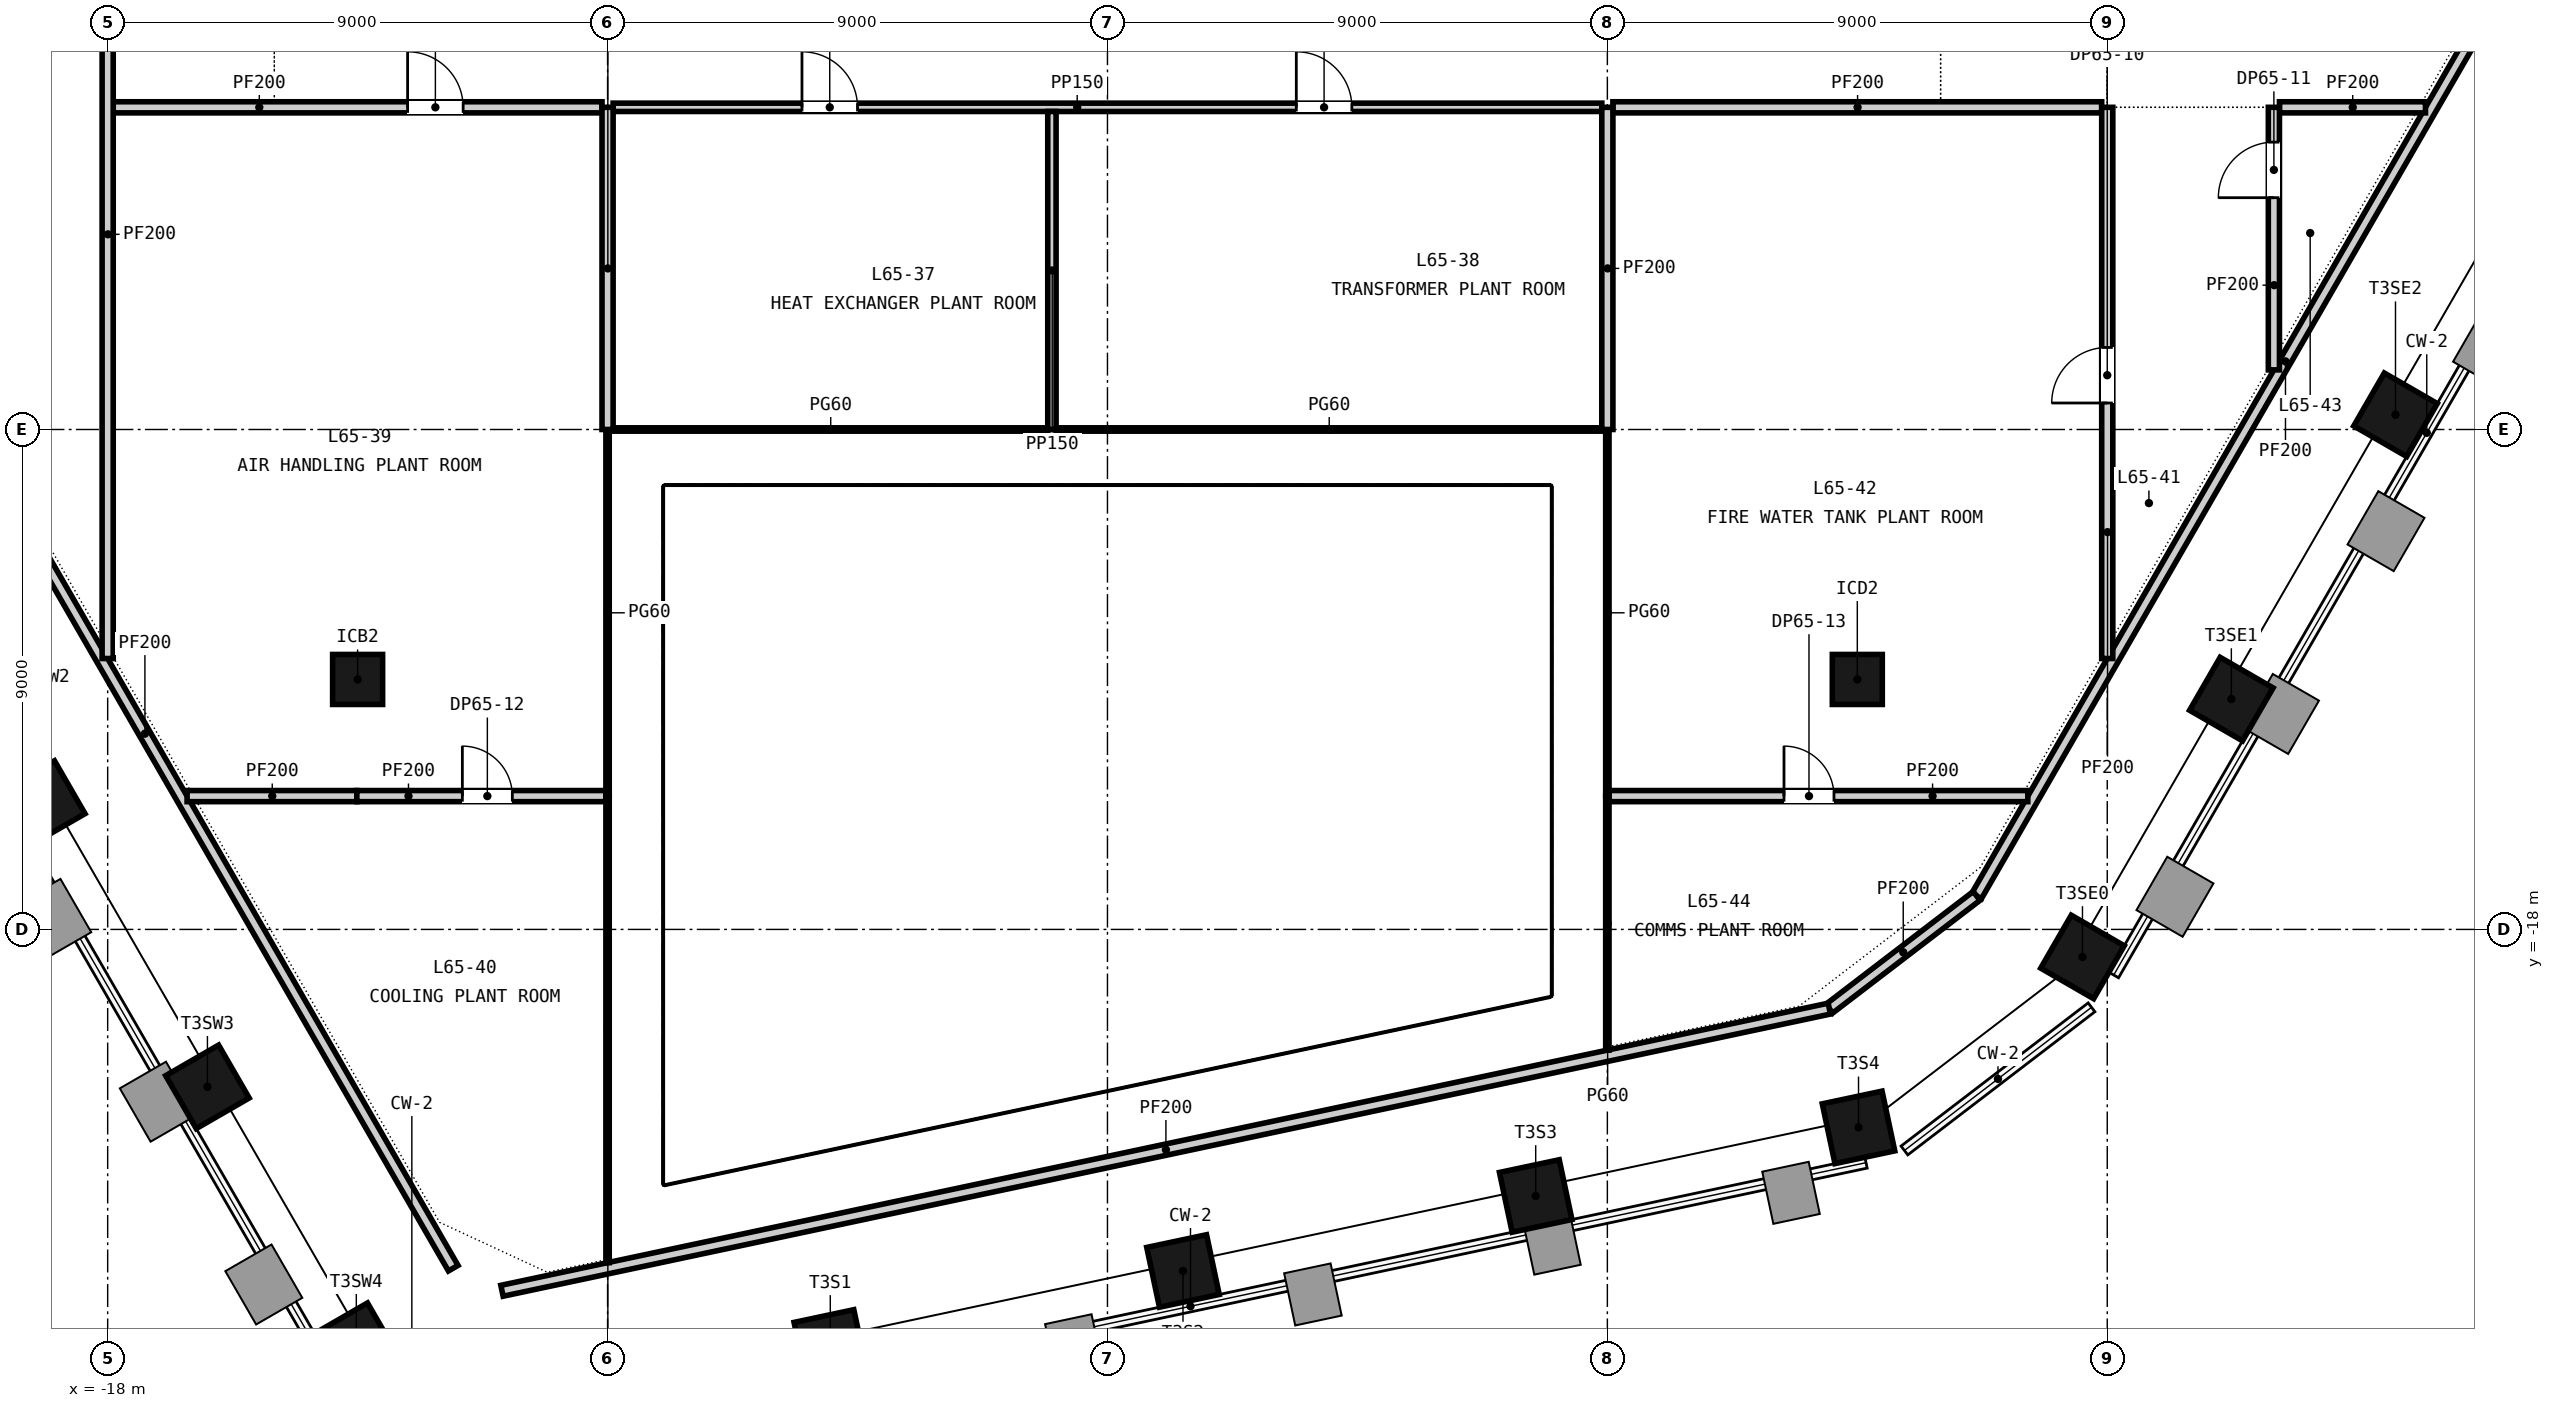
"""IFC4 building model, lengths in metres.
Left out: names, types, materials, properties, quantities, classifications, styles, units other than length and angle.
Written with IfcOpenShell. Run it as: python <this file> out.ifc"""

import sys

from ifc_helpers import new_model, si_unit, direction, frame, frame_2d, origin, origin_2d, place, context, subcontext, project, spatial, rectangle, extrude, element, fill, save


model = new_model("IFC4")
c1 = context("Model", 3, precision=1e-05, world=origin(), true_north=direction((0.0, 1.0)))
c2 = subcontext(c1, "Body", "Model", "MODEL_VIEW")
j1 = project(units=[si_unit("LENGTHUNIT", "METRE"), si_unit("PLANEANGLEUNIT", "RADIAN")], contexts=[c1])
p1 = place(None, origin())
s1 = spatial("IfcSite", under=j1, at=p1, CompositionType="ELEMENT")
p2 = place(p1, origin())
s2 = spatial("IfcBuilding", under=s1, at=p2, CompositionType="ELEMENT")
p3 = place(p2, frame((0.0, 0.0, 256.45)))
s3 = spatial("IfcBuildingStorey", under=s2, at=p3, CompositionType="ELEMENT", Elevation=256.45)
for number, where, z_axis, x_axis in (
    (1, (-19.159, -15.715, -0.3), (0.0, 0.0, 1.0), (0.5, -0.866, 0.0)),
    (2, (-16.204, -20.834, -0.3), (0.0, 0.0, 1.0), (0.5, -0.866, 0.0)),
    (3, (-13.524, -25.476, -0.3), (0.0, 0.0, 1.0), (0.5, -0.866, 0.0)),
    (4, (-4.99, -25.498, -0.3), (0.0, 0.0, 1.0), (0.978, 0.208, 0.0)),
    (5, (1.36, -24.149, -0.3), (0.0, 0.0, 1.0), (0.978, 0.208, 0.0)),
    (6, (7.71, -22.799, -0.3), (0.0, 0.0, 1.0), (0.978, 0.208, 0.0)),
    (7, (13.522, -21.563, -0.3), (0.0, 0.0, 1.0), (0.978, 0.208, 0.0)),
    (8, (17.554, -18.496, -0.3), (0.0, 0.0, 1.0), (0.5, 0.866, 0.0)),
    (9, (20.234, -13.854, -0.3), (0.0, 0.0, 1.0), (0.5, 0.866, 0.0)),
    (10, (23.189, -8.735, -0.3), (0.0, 0.0, 1.0), (0.5, 0.866, 0.0)),
):
    element("IfcColumn", number, at=place(p3, frame(where, z_axis=z_axis, x_axis=x_axis)), inside=s3, PredefinedType="COLUMN", context=c2, shape_type="SweptSolid", body=[
        extrude(rectangle(XDim=1.1, YDim=1.1, at=origin_2d()), origin(), (0.0, 0.0, 1.0), 4.65),
    ])
for number, where, z_axis, x_axis in (
    (11, (-13.5, -13.5, -0.3), (0.0, 0.0, 1.0), (1.0, 0.0, 0.0)),
    (12, (13.5, -13.5, -0.3), (0.0, 0.0, 1.0), (1.0, 0.0, 0.0)),
):
    element("IfcColumn", number, at=place(p3, frame(where, z_axis=z_axis, x_axis=x_axis)), inside=s3, PredefinedType="COLUMN", context=c2, shape_type="SweptSolid", body=[
        extrude(rectangle(XDim=0.9, YDim=0.9, at=origin_2d()), origin(), (0.0, 0.0, 1.0), 4.65),
    ])
p4 = place(p3, frame((-16.57, -15.6, 0.0), z_axis=(0.0, 0.0, 1.0), x_axis=(1.0, 0.0, 0.0)))
e13 = element("IfcWall", 13, at=p4, inside=s3, PredefinedType="PARTITIONING", context=c2, shape_type="SweptSolid", body=[
    extrude(rectangle(XDim=3.056, YDim=0.2, at=frame_2d((1.528, 0.0))), origin(), (0.0, 0.0, 1.0), 3.947),
])
p5 = place(p3, frame((-13.514, -15.6, 0.0), z_axis=(0.0, 0.0, 1.0), x_axis=(1.0, 0.0, 0.0)))
e14 = element("IfcWall", 14, at=p5, inside=s3, PredefinedType="PARTITIONING", context=c2, shape_type="SweptSolid", body=[
    extrude(rectangle(XDim=4.484, YDim=0.2, at=frame_2d((2.242, 0.0))), origin(), (0.0, 0.0, 1.0), 4.35),
])
p6 = place(p5, frame((1.9, 0.0, 0.0)))
e15 = element("IfcOpeningElement", 15, at=p6, cuts=e14, PredefinedType="OPENING", context=c2, shape_type="SweptSolid", body=[
    extrude(rectangle(XDim=0.9, YDim=2.1, at=frame_2d((0.45, 1.05))), frame((0.0, 0.11, 0.0), z_axis=(0.0, -1.0, 0.0), x_axis=(1.0, 0.0, 0.0)), (0.0, 0.0, 1.0), 0.22),
])
p7 = place(p3, frame((9.03, -15.6, 0.0), z_axis=(0.0, 0.0, 1.0), x_axis=(1.0, 0.0, 0.0)))
e16 = element("IfcWall", 16, at=p7, inside=s3, PredefinedType="PARTITIONING", context=c2, shape_type="SweptSolid", body=[
    extrude(rectangle(XDim=7.54, YDim=0.2, at=frame_2d((3.77, 0.0))), origin(), (0.0, 0.0, 1.0), 4.35),
])
p8 = place(p7, frame((3.15, 0.0, 0.0)))
e17 = element("IfcOpeningElement", 17, at=p8, cuts=e16, PredefinedType="OPENING", context=c2, shape_type="SweptSolid", body=[
    extrude(rectangle(XDim=0.9, YDim=2.1, at=frame_2d((0.45, 1.05))), frame((0.0, 0.11, 0.0), z_axis=(0.0, -1.0, 0.0), x_axis=(1.0, 0.0, 0.0)), (0.0, 0.0, 1.0), 0.22),
])
p9 = place(p3, frame((-8.9, -9.0, 0.0), z_axis=(0.0, 0.0, 1.0), x_axis=(1.0, 0.0, 0.0)))
e18 = element("IfcWall", 18, at=p9, inside=s3, PredefinedType="PARTITIONING", context=c2, shape_type="SweptSolid", body=[
    extrude(rectangle(XDim=7.825, YDim=0.06, at=frame_2d((3.913, 0.0))), origin(), (0.0, 0.0, 1.0), 4.35),
])
p10 = place(p3, frame((-0.925, -9.0, 0.0), z_axis=(0.0, 0.0, 1.0), x_axis=(1.0, 0.0, 0.0)))
e19 = element("IfcWall", 19, at=p10, inside=s3, PredefinedType="PARTITIONING", context=c2, shape_type="SweptSolid", body=[
    extrude(rectangle(XDim=9.825, YDim=0.06, at=frame_2d((4.913, 0.0))), origin(), (0.0, 0.0, 1.0), 4.35),
])
p11 = place(p3, frame((-17.9, -3.2, 0.0), z_axis=(0.0, 0.0, 1.0), x_axis=(1.0, 0.0, 0.0)))
e20 = element("IfcWall", 20, at=p11, inside=s3, PredefinedType="PARTITIONING", context=c2, shape_type="SweptSolid", body=[
    extrude(rectangle(XDim=8.8, YDim=0.2, at=frame_2d((4.4, 0.0))), origin(), (0.0, 0.0, 1.0), 4.35),
])
p12 = place(p11, frame((5.3, 0.0, 0.0)))
e21 = element("IfcOpeningElement", 21, at=p12, cuts=e20, PredefinedType="OPENING", context=c2, shape_type="SweptSolid", body=[
    extrude(rectangle(XDim=1.0, YDim=2.1, at=frame_2d((0.5, 1.05))), frame((0.0, 0.11, 0.0), z_axis=(0.0, -1.0, 0.0), x_axis=(1.0, 0.0, 0.0)), (0.0, 0.0, 1.0), 0.22),
])
p13 = place(p3, frame((-8.9, -3.2, 0.0), z_axis=(0.0, 0.0, 1.0), x_axis=(1.0, 0.0, 0.0)))
e22 = element("IfcWall", 22, at=p13, inside=s3, PredefinedType="PARTITIONING", context=c2, shape_type="SweptSolid", body=[
    extrude(rectangle(XDim=17.8, YDim=0.15, at=frame_2d((8.9, 0.0))), origin(), (0.0, 0.0, 1.0), 4.35),
])
p14 = place(p13, frame((3.4, 0.0, 0.0)))
e23 = element("IfcOpeningElement", 23, at=p14, cuts=e22, PredefinedType="OPENING", context=c2, shape_type="SweptSolid", body=[
    extrude(rectangle(XDim=1.0, YDim=2.1, at=frame_2d((0.5, 1.05))), frame((0.0, 0.085, 0.0), z_axis=(0.0, -1.0, 0.0), x_axis=(1.0, 0.0, 0.0)), (0.0, 0.0, 1.0), 0.17),
])
p15 = place(p13, frame((12.3, 0.0, 0.0)))
e24 = element("IfcOpeningElement", 24, at=p15, cuts=e22, PredefinedType="OPENING", context=c2, shape_type="SweptSolid", body=[
    extrude(rectangle(XDim=1.0, YDim=2.1, at=frame_2d((0.5, 1.05))), frame((0.0, 0.085, 0.0), z_axis=(0.0, -1.0, 0.0), x_axis=(1.0, 0.0, 0.0)), (0.0, 0.0, 1.0), 0.17),
])
p16 = place(p3, frame((9.1, -3.2, 0.0), z_axis=(0.0, 0.0, 1.0), x_axis=(1.0, 0.0, 0.0)))
e25 = element("IfcWall", 25, at=p16, inside=s3, PredefinedType="PARTITIONING", context=c2, shape_type="SweptSolid", body=[
    extrude(rectangle(XDim=8.8, YDim=0.2, at=frame_2d((4.4, 0.0))), origin(), (0.0, 0.0, 1.0), 4.35),
])
p17 = place(p3, frame((21.1, -3.2, 0.0), z_axis=(0.0, 0.0, 1.0), x_axis=(1.0, 0.0, 0.0)))
e26 = element("IfcWall", 26, at=p17, inside=s3, PredefinedType="PARTITIONING", context=c2, shape_type="SweptSolid", body=[
    extrude(rectangle(XDim=2.629, YDim=0.2, at=frame_2d((1.314, 0.0))), origin(), (0.0, 0.0, 1.0), 4.35),
])
p18 = place(p3, frame((-18.0, -13.123, 0.0), z_axis=(0.0, 0.0, 1.0), x_axis=(0.0, 1.0, 0.0)))
e27 = element("IfcWall", 27, at=p18, inside=s3, PredefinedType="PARTITIONING", context=c2, shape_type="SweptSolid", body=[
    extrude(rectangle(XDim=27.636, YDim=0.2, at=frame_2d((13.818, 0.0))), origin(), (0.0, 0.0, 1.0), 4.35),
])
p19 = place(p18, frame((15.323, 0.0, 0.0)))
e28 = element("IfcOpeningElement", 28, at=p19, cuts=e27, PredefinedType="OPENING", context=c2, shape_type="SweptSolid", body=[
    extrude(rectangle(XDim=1.8, YDim=2.4, at=frame_2d((0.9, 1.2))), frame((0.0, 0.11, 0.0), z_axis=(0.0, -1.0, 0.0), x_axis=(1.0, 0.0, 0.0)), (0.0, 0.0, 1.0), 0.22),
])
p20 = place(p18, frame((20.323, 0.0, 0.0)))
e29 = element("IfcOpeningElement", 29, at=p20, cuts=e27, PredefinedType="OPENING", context=c2, shape_type="SweptSolid", body=[
    extrude(rectangle(XDim=1.2, YDim=2.1, at=frame_2d((0.6, 1.05))), frame((0.0, 0.11, 0.0), z_axis=(0.0, -1.0, 0.0), x_axis=(1.0, 0.0, 0.0)), (0.0, 0.0, 1.0), 0.22),
])
p21 = place(p3, frame((-9.0, -23.999, 0.0), z_axis=(0.0, 0.0, 1.0), x_axis=(0.0, 1.0, 0.0)))
e30 = element("IfcWall", 30, at=p21, inside=s3, PredefinedType="PARTITIONING", context=c2, shape_type="SweptSolid", body=[
    extrude(rectangle(XDim=8.398, YDim=0.06, at=frame_2d((4.199, 0.0))), origin(), (0.0, 0.0, 1.0), 4.35),
])
p22 = place(p3, frame((-9.0, -15.599, 0.0), z_axis=(0.0, 0.0, 1.0), x_axis=(0.0, 1.0, 0.0)))
e31 = element("IfcWall", 31, at=p22, inside=s3, PredefinedType="PARTITIONING", context=c2, shape_type="SweptSolid", body=[
    extrude(rectangle(XDim=6.598, YDim=0.06, at=frame_2d((3.299, 0.0))), origin(), (0.0, 0.0, 1.0), 4.35),
])
p23 = place(p3, frame((-9.0, -9.0, 0.0), z_axis=(0.0, 0.0, 1.0), x_axis=(0.0, 1.0, 0.0)))
e32 = element("IfcWall", 32, at=p23, inside=s3, PredefinedType="PARTITIONING", context=c2, shape_type="SweptSolid", body=[
    extrude(rectangle(XDim=5.8, YDim=0.2, at=frame_2d((2.9, 0.0))), origin(), (0.0, 0.0, 1.0), 4.35),
])
p24 = place(p3, frame((-1.0, -9.0, 0.0), z_axis=(0.0, 0.0, 1.0), x_axis=(0.0, 1.0, 0.0)))
e33 = element("IfcWall", 33, at=p24, inside=s3, PredefinedType="PARTITIONING", context=c2, shape_type="SweptSolid", body=[
    extrude(rectangle(XDim=5.725, YDim=0.15, at=frame_2d((2.863, 0.0))), origin(), (0.0, 0.0, 1.0), 4.35),
])
p25 = place(p3, frame((9.0, -20.173, 0.0), z_axis=(0.0, 0.0, 1.0), x_axis=(0.0, 1.0, 0.0)))
e34 = element("IfcWall", 34, at=p25, inside=s3, PredefinedType="PARTITIONING", context=c2, shape_type="SweptSolid", body=[
    extrude(rectangle(XDim=4.572, YDim=0.06, at=frame_2d((2.286, 0.0))), origin(), (0.0, 0.0, 1.0), 4.35),
])
p26 = place(p3, frame((9.0, -15.599, 0.0), z_axis=(0.0, 0.0, 1.0), x_axis=(0.0, 1.0, 0.0)))
e35 = element("IfcWall", 35, at=p26, inside=s3, PredefinedType="PARTITIONING", context=c2, shape_type="SweptSolid", body=[
    extrude(rectangle(XDim=6.598, YDim=0.06, at=frame_2d((3.299, 0.0))), origin(), (0.0, 0.0, 1.0), 4.35),
])
p27 = place(p3, frame((9.0, -9.0, 0.0), z_axis=(0.0, 0.0, 1.0), x_axis=(0.0, 1.0, 0.0)))
e36 = element("IfcWall", 36, at=p27, inside=s3, PredefinedType="PARTITIONING", context=c2, shape_type="SweptSolid", body=[
    extrude(rectangle(XDim=5.8, YDim=0.2, at=frame_2d((2.9, 0.0))), origin(), (0.0, 0.0, 1.0), 4.35),
])
p28 = place(p3, frame((18.0, -13.123, 0.0), z_axis=(0.0, 0.0, 1.0), x_axis=(0.0, 1.0, 0.0)))
e37 = element("IfcWall", 37, at=p28, inside=s3, PredefinedType="PARTITIONING", context=c2, shape_type="SweptSolid", body=[
    extrude(rectangle(XDim=9.923, YDim=0.2, at=frame_2d((4.961, 0.0))), origin(), (0.0, 0.0, 1.0), 4.35),
])
p29 = place(p28, frame((4.6, 0.0, 0.0)))
e38 = element("IfcOpeningElement", 38, at=p29, cuts=e37, PredefinedType="OPENING", context=c2, shape_type="SweptSolid", body=[
    extrude(rectangle(XDim=1.0, YDim=2.1, at=frame_2d((0.5, 1.05))), frame((0.0, 0.11, 0.0), z_axis=(0.0, -1.0, 0.0), x_axis=(1.0, 0.0, 0.0)), (0.0, 0.0, 1.0), 0.22),
])
p30 = place(p3, frame((21.0, -7.927, 0.0), z_axis=(0.0, 0.0, 1.0), x_axis=(0.0, 1.0, 0.0)))
e39 = element("IfcWall", 39, at=p30, inside=s3, PredefinedType="PARTITIONING", context=c2, shape_type="SweptSolid", body=[
    extrude(rectangle(XDim=4.727, YDim=0.2, at=frame_2d((2.364, 0.0))), origin(), (0.0, 0.0, 1.0), 4.35),
])
p31 = place(p30, frame((3.1, 0.0, 0.0)))
e40 = element("IfcOpeningElement", 40, at=p31, cuts=e39, PredefinedType="OPENING", context=c2, shape_type="SweptSolid", body=[
    extrude(rectangle(XDim=1.0, YDim=2.1, at=frame_2d((0.5, 1.05))), frame((0.0, 0.11, 0.0), z_axis=(0.0, -1.0, 0.0), x_axis=(1.0, 0.0, 0.0)), (0.0, 0.0, 1.0), 0.22),
])
p32 = place(p3, frame((26.76, 1.849, 0.0), z_axis=(0.0, 0.0, 1.0), x_axis=(-0.499999183719, -0.866025875064, 0.0)))
e41 = element("IfcWall", 41, at=p32, inside=s3, PredefinedType="PARTITIONING", context=c2, shape_type="SweptSolid", body=[
    extrude(rectangle(XDim=22.223, YDim=0.2, at=frame_2d((11.112, 0.0))), origin(), (0.0, 0.0, 1.0), 4.35),
])
p33 = place(p3, frame((15.648, -17.397, 0.0), z_axis=(0.0, 0.0, 1.0), x_axis=(-0.794208407405, -0.607645460452, 0.0)))
e42 = element("IfcWall", 42, at=p33, inside=s3, PredefinedType="PARTITIONING", context=c2, shape_type="SweptSolid", body=[
    extrude(rectangle(XDim=3.34, YDim=0.2, at=frame_2d((1.67, 0.0))), origin(), (0.0, 0.0, 1.0), 4.35),
])
p34 = place(p3, frame((12.996, -19.426, 0.0), z_axis=(0.0, 0.0, 1.0), x_axis=(-0.978147674418, -0.207911344159, 0.0)))
e43 = element("IfcWall", 43, at=p34, inside=s3, PredefinedType="PARTITIONING", context=c2, shape_type="SweptSolid", body=[
    extrude(rectangle(XDim=24.43, YDim=0.2, at=frame_2d((12.215, 0.0))), origin(), (0.0, 0.0, 1.0), 4.35),
])
p35 = place(p3, frame((-11.779, -24.099, 0.0), z_axis=(0.0, 0.0, 1.0), x_axis=(-0.499990944252, 0.86603063206, 0.0)))
e44 = element("IfcWall", 44, at=p35, inside=s3, PredefinedType="PARTITIONING", context=c2, shape_type="SweptSolid", body=[
    extrude(rectangle(XDim=22.223, YDim=0.2, at=frame_2d((11.112, 0.0))), origin(), (0.0, 0.0, 1.0), 4.35),
])
p36 = place(p14, origin())
e45 = element("IfcDoor", 45, at=p36, inside=s3, OperationType="SINGLE_SWING_LEFT", PredefinedType="DOOR", context=c2, shape_type="SweptSolid", body=[
    extrude(rectangle(XDim=1.0, YDim=2.1, at=frame_2d((0.5, 1.05))), frame((0.0, 0.025, 0.0), z_axis=(0.0, -1.0, 0.0), x_axis=(1.0, 0.0, 0.0)), (0.0, 0.0, 1.0), 0.05),
])
fill(e23, e45)
p37 = place(p15, origin())
e46 = element("IfcDoor", 46, at=p37, inside=s3, OperationType="SINGLE_SWING_LEFT", PredefinedType="DOOR", context=c2, shape_type="SweptSolid", body=[
    extrude(rectangle(XDim=1.0, YDim=2.1, at=frame_2d((0.5, 1.05))), frame((0.0, 0.025, 0.0), z_axis=(0.0, -1.0, 0.0), x_axis=(1.0, 0.0, 0.0)), (0.0, 0.0, 1.0), 0.05),
])
fill(e24, e46)
p38 = place(p12, origin())
e47 = element("IfcDoor", 47, at=p38, inside=s3, OperationType="SINGLE_SWING_LEFT", PredefinedType="DOOR", context=c2, shape_type="SweptSolid", body=[
    extrude(rectangle(XDim=1.0, YDim=2.1, at=frame_2d((0.5, 1.05))), frame((0.0, 0.025, 0.0), z_axis=(0.0, -1.0, 0.0), x_axis=(1.0, 0.0, 0.0)), (0.0, 0.0, 1.0), 0.05),
])
fill(e21, e47)
p39 = place(p29, origin())
e48 = element("IfcDoor", 48, at=p39, inside=s3, OperationType="SINGLE_SWING_LEFT", PredefinedType="DOOR", context=c2, shape_type="SweptSolid", body=[
    extrude(rectangle(XDim=1.0, YDim=2.1, at=frame_2d((0.5, 1.05))), frame((0.0, 0.025, 0.0), z_axis=(0.0, -1.0, 0.0), x_axis=(1.0, 0.0, 0.0)), (0.0, 0.0, 1.0), 0.05),
])
fill(e38, e48)
p40 = place(p31, origin())
e49 = element("IfcDoor", 49, at=p40, inside=s3, OperationType="SINGLE_SWING_LEFT", PredefinedType="DOOR", context=c2, shape_type="SweptSolid", body=[
    extrude(rectangle(XDim=1.0, YDim=2.1, at=frame_2d((0.5, 1.05))), frame((0.0, 0.025, 0.0), z_axis=(0.0, -1.0, 0.0), x_axis=(1.0, 0.0, 0.0)), (0.0, 0.0, 1.0), 0.05),
])
fill(e40, e49)
p41 = place(p6, origin())
e50 = element("IfcDoor", 50, at=p41, inside=s3, OperationType="SINGLE_SWING_LEFT", PredefinedType="DOOR", context=c2, shape_type="SweptSolid", body=[
    extrude(rectangle(XDim=0.9, YDim=2.1, at=frame_2d((0.45, 1.05))), frame((0.0, 0.025, 0.0), z_axis=(0.0, -1.0, 0.0), x_axis=(1.0, 0.0, 0.0)), (0.0, 0.0, 1.0), 0.05),
])
fill(e15, e50)
p42 = place(p8, origin())
e51 = element("IfcDoor", 51, at=p42, inside=s3, OperationType="SINGLE_SWING_LEFT", PredefinedType="DOOR", context=c2, shape_type="SweptSolid", body=[
    extrude(rectangle(XDim=0.9, YDim=2.1, at=frame_2d((0.45, 1.05))), frame((0.0, 0.025, 0.0), z_axis=(0.0, -1.0, 0.0), x_axis=(1.0, 0.0, 0.0)), (0.0, 0.0, 1.0), 0.05),
])
fill(e17, e51)
save(model, sys.argv[1])
